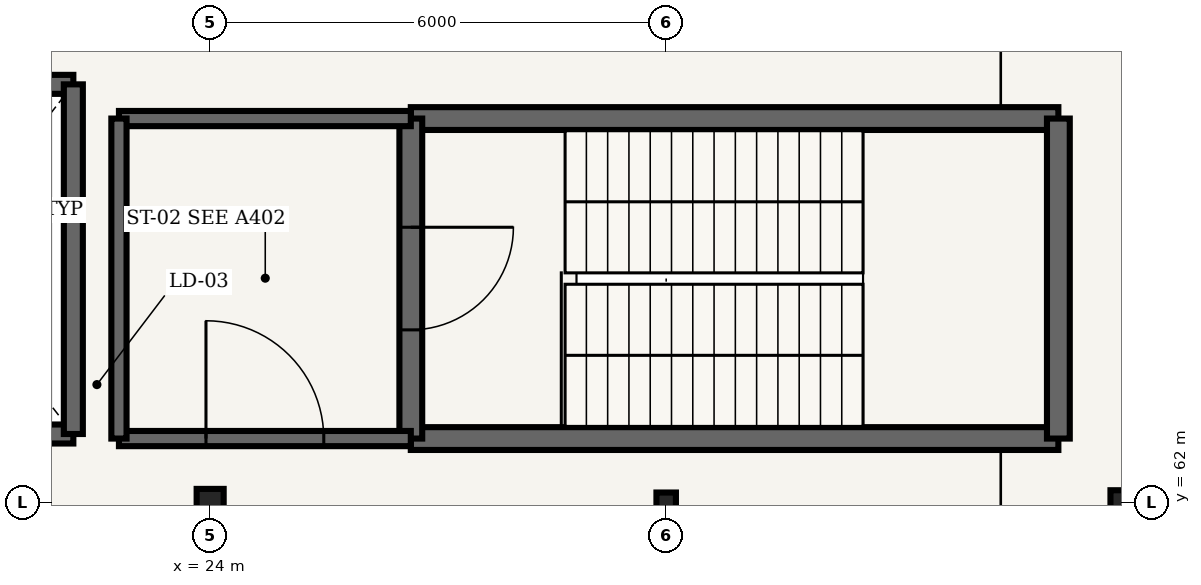
"""IFC4 building model, lengths in metres.
Left out: names, types, materials, properties, quantities, classifications, styles, units other than length and angle.
Written with IfcOpenShell. Run it as: python <this file> out.ifc"""

import sys

from ifc_helpers import new_model, si_unit, direction, frame, frame_2d, origin, origin_2d, place, context, subcontext, project, spatial, rectangle, hollow_circle, i_section, extrude, element, fill, save


model = new_model("IFC4")
c1 = context("Model", 3, precision=1e-05, world=origin(), true_north=direction((0.0, 1.0)))
c2 = subcontext(c1, "Body", "Model", "MODEL_VIEW")
j1 = project(units=[si_unit("LENGTHUNIT", "METRE"), si_unit("PLANEANGLEUNIT", "RADIAN")], contexts=[c1])
p1 = place(None, origin())
s1 = spatial("IfcSite", under=j1, at=p1, CompositionType="ELEMENT")
p2 = place(p1, origin())
s2 = spatial("IfcBuilding", under=s1, at=p2, CompositionType="ELEMENT")
p3 = place(p2, frame((0.0, 0.0, 10.8)))
s3 = spatial("IfcBuildingStorey", under=s2, at=p3, CompositionType="ELEMENT", Elevation=10.8)
p4 = place(p3, frame((24.0, 62.0, 0.0), z_axis=(0.0, 0.0, 1.0), x_axis=(1.0, 0.0, 0.0)))
e1 = element("IfcColumn", 1, at=p4, inside=s3, PredefinedType="COLUMN", context=c2, shape_type="SweptSolid", body=[
    extrude(hollow_circle(Radius=0.178, WallThickness=0.012, at=origin_2d()), origin(), (0.0, 0.0, 1.0), 6.63),
])
p5 = place(p3, frame((30.0, 62.0, 0.0), z_axis=(0.0, 0.0, 1.0), x_axis=(1.0, 0.0, 0.0)))
e2 = element("IfcColumn", 2, at=p5, inside=s3, PredefinedType="COLUMN", context=c2, shape_type="SweptSolid", body=[
    extrude(i_section(OverallWidth=0.256, OverallDepth=0.26, WebThickness=0.01, FlangeThickness=0.017, FilletRadius=0.013, at=origin_2d()), origin(), (0.0, 0.0, 1.0), 7.89),
])
p6 = place(p3, frame((36.0, 62.0, 0.0), z_axis=(0.0, 0.0, 1.0), x_axis=(1.0, 0.0, 0.0)))
e3 = element("IfcColumn", 3, at=p6, inside=s3, PredefinedType="COLUMN", context=c2, shape_type="SweptSolid", body=[
    extrude(i_section(OverallWidth=0.309, OverallDepth=0.321, WebThickness=0.014, FlangeThickness=0.022, FilletRadius=0.015, at=origin_2d()), origin(), (0.0, 0.0, 1.0), 4.8),
])
for number, where, z_axis, x_axis in (
    (4, (26.64, 62.84, 0.0), (0.0, 0.0, 1.0), (1.0, 0.0, 0.0)),
    (5, (35.16, 67.05, 0.0), (0.0, 0.0, 1.0), (-1.0, 0.0, 0.0)),
):
    element("IfcWall", number, at=place(p3, frame(where, z_axis=z_axis, x_axis=x_axis)), inside=s3, PredefinedType="SHEAR", context=c2, shape_type="SweptSolid", body=[
        extrude(rectangle(XDim=8.52, YDim=0.3, at=frame_2d((4.26, 0.0))), origin(), (0.0, 0.0, 1.0), 3.52),
    ])
p7 = place(p3, frame((26.64, 67.05, 0.0), z_axis=(0.0, 0.0, 1.0), x_axis=(0.0, -1.0, 0.0)))
e6 = element("IfcWall", 6, at=p7, inside=s3, PredefinedType="SHEAR", context=c2, shape_type="SweptSolid", body=[
    extrude(rectangle(XDim=4.21, YDim=0.3, at=frame_2d((2.105, 0.0))), origin(), (0.0, 0.0, 1.0), 3.52),
])
p8 = place(p7, frame((1.43, 0.0, 0.0)))
e7 = element("IfcOpeningElement", 7, at=p8, cuts=e6, PredefinedType="OPENING", context=c2, shape_type="SweptSolid", body=[
    extrude(rectangle(XDim=1.35, YDim=2.2, at=frame_2d((0.675, 1.1))), frame((0.0, 0.16, 0.0), z_axis=(0.0, -1.0, 0.0), x_axis=(1.0, 0.0, 0.0)), (0.0, 0.0, 1.0), 0.32),
])
p9 = place(p3, frame((35.16, 62.84, 0.0), z_axis=(0.0, 0.0, 1.0), x_axis=(0.0, 1.0, 0.0)))
e8 = element("IfcWall", 8, at=p9, inside=s3, PredefinedType="SHEAR", context=c2, shape_type="SweptSolid", body=[
    extrude(rectangle(XDim=4.21, YDim=0.3, at=frame_2d((2.105, 0.0))), origin(), (0.0, 0.0, 1.0), 3.52),
])
p10 = place(p3, frame((22.8, 62.84, 0.0), z_axis=(0.0, 0.0, 1.0), x_axis=(1.0, 0.0, 0.0)))
e9 = element("IfcWall", 9, at=p10, inside=s3, PredefinedType="SHEAR", context=c2, shape_type="SweptSolid", body=[
    extrude(rectangle(XDim=3.84, YDim=0.2, at=frame_2d((1.92, 0.0))), origin(), (0.0, 0.0, 1.0), 3.52),
])
p11 = place(p10, frame((1.145, 0.0, 0.0)))
e10 = element("IfcOpeningElement", 10, at=p11, cuts=e9, PredefinedType="OPENING", context=c2, shape_type="SweptSolid", body=[
    extrude(rectangle(XDim=1.55, YDim=2.2, at=frame_2d((0.775, 1.1))), frame((0.0, 0.11, 0.0), z_axis=(0.0, -1.0, 0.0), x_axis=(1.0, 0.0, 0.0)), (0.0, 0.0, 1.0), 0.22),
])
p12 = place(p3, frame((26.64, 67.05, 0.0), z_axis=(0.0, 0.0, 1.0), x_axis=(-1.0, 0.0, 0.0)))
e11 = element("IfcWall", 11, at=p12, inside=s3, PredefinedType="SHEAR", context=c2, shape_type="SweptSolid", body=[
    extrude(rectangle(XDim=3.84, YDim=0.2, at=frame_2d((1.92, 0.0))), origin(), (0.0, 0.0, 1.0), 3.52),
])
p13 = place(p3, frame((22.8, 67.05, 0.0), z_axis=(0.0, 0.0, 1.0), x_axis=(0.0, -1.0, 0.0)))
e12 = element("IfcWall", 12, at=p13, inside=s3, PredefinedType="SHEAR", context=c2, shape_type="SweptSolid", body=[
    extrude(rectangle(XDim=4.21, YDim=0.2, at=frame_2d((2.105, 0.0))), origin(), (0.0, 0.0, 1.0), 3.52),
])
p14 = place(p3, frame((18.6, 62.9, 0.0), z_axis=(0.0, 0.0, 1.0), x_axis=(1.0, 0.0, 0.0)))
e13 = element("IfcWall", 13, at=p14, inside=s3, PredefinedType="SHEAR", context=c2, shape_type="SweptSolid", body=[
    extrude(rectangle(XDim=3.6, YDim=0.25, at=frame_2d((1.8, 0.0))), origin(), (0.0, 0.0, 1.0), 3.52),
])
p15 = place(p14, frame((0.6, 0.0, 0.0)))
e14 = element("IfcOpeningElement", 14, at=p15, cuts=e13, PredefinedType="OPENING", context=c2, shape_type="SweptSolid", body=[
    extrude(rectangle(XDim=2.4, YDim=2.6, at=frame_2d((1.2, 1.3))), frame((0.0, 0.135, 0.0), z_axis=(0.0, -1.0, 0.0), x_axis=(1.0, 0.0, 0.0)), (0.0, 0.0, 1.0), 0.27),
])
p16 = place(p3, frame((22.2, 67.5, 0.0), z_axis=(0.0, 0.0, 1.0), x_axis=(-1.0, 0.0, 0.0)))
e15 = element("IfcWall", 15, at=p16, inside=s3, PredefinedType="SHEAR", context=c2, shape_type="SweptSolid", body=[
    extrude(rectangle(XDim=3.6, YDim=0.25, at=frame_2d((1.8, 0.0))), origin(), (0.0, 0.0, 1.0), 3.52),
])
p17 = place(p3, frame((22.2, 62.9, 0.0), z_axis=(0.0, 0.0, 1.0), x_axis=(0.0, 1.0, 0.0)))
e16 = element("IfcWall", 16, at=p17, inside=s3, PredefinedType="SHEAR", context=c2, shape_type="SweptSolid", body=[
    extrude(rectangle(XDim=4.6, YDim=0.25, at=frame_2d((2.3, 0.0))), origin(), (0.0, 0.0, 1.0), 3.52),
])
p18 = place(p8, origin())
e17 = element("IfcDoor", 17, at=p18, inside=s3, OperationType="SINGLE_SWING_LEFT", PredefinedType="DOOR", context=c2, shape_type="SweptSolid", body=[
    extrude(rectangle(XDim=1.35, YDim=2.2, at=frame_2d((0.675, 1.1))), frame((0.0, 0.025, 0.0), z_axis=(0.0, -1.0, 0.0), x_axis=(1.0, 0.0, 0.0)), (0.0, 0.0, 1.0), 0.05),
])
fill(e7, e17)
p19 = place(p11, origin())
e18 = element("IfcDoor", 18, at=p19, inside=s3, OperationType="SINGLE_SWING_LEFT", PredefinedType="DOOR", context=c2, shape_type="SweptSolid", body=[
    extrude(rectangle(XDim=1.55, YDim=2.2, at=frame_2d((0.775, 1.1))), frame((0.0, 0.025, 0.0), z_axis=(0.0, -1.0, 0.0), x_axis=(1.0, 0.0, 0.0)), (0.0, 0.0, 1.0), 0.05),
])
fill(e10, e18)
save(model, sys.argv[1])
